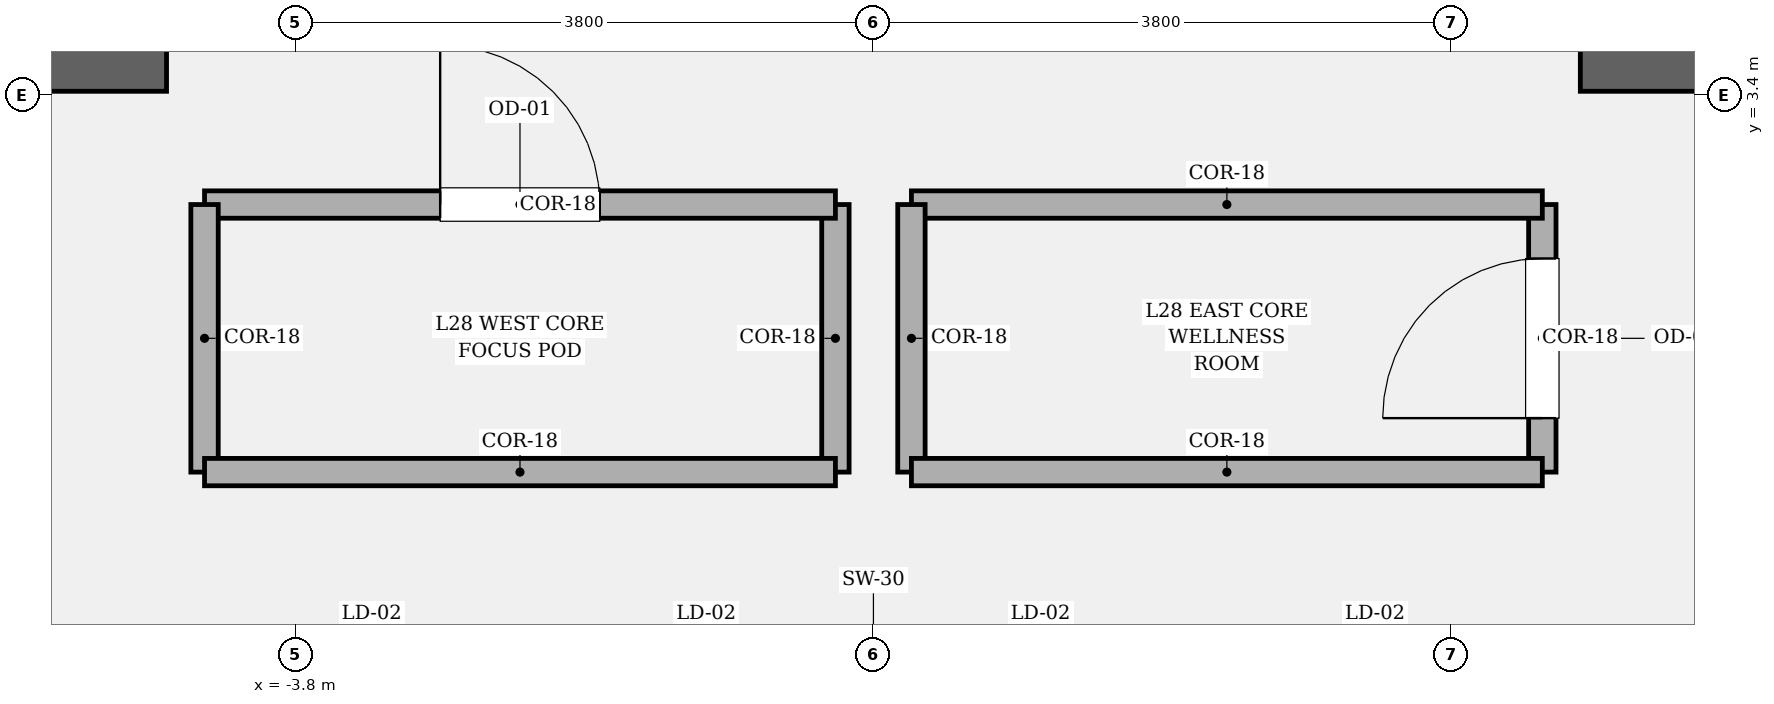
"""IFC4 building model, lengths in metres.
Left out: names, types, materials, properties, quantities, classifications, styles, units other than length and angle.
Written with IfcOpenShell. Run it as: python <this file> out.ifc"""

import sys

from ifc_helpers import new_model, si_unit, direction, frame, frame_2d, origin, place, context, subcontext, project, spatial, rectangle, extrude, element, fill, save


model = new_model("IFC4")
c1 = context("Model", 3, precision=1e-05, world=origin(), true_north=direction((0.0, 1.0)))
c2 = subcontext(c1, "Body", "Model", "MODEL_VIEW")
j1 = project(units=[si_unit("LENGTHUNIT", "METRE"), si_unit("PLANEANGLEUNIT", "RADIAN")], contexts=[c1])
p1 = place(None, origin())
s1 = spatial("IfcSite", under=j1, at=p1, CompositionType="ELEMENT")
p2 = place(p1, origin())
s2 = spatial("IfcBuilding", under=s1, at=p2, CompositionType="ELEMENT")
p3 = place(p2, frame((0.0, 0.0, 121.35)))
s3 = spatial("IfcBuildingStorey", under=s2, at=p3, CompositionType="ELEMENT", Elevation=121.35)
for number, where, z_axis, x_axis in (
    (1, (-9.825, 3.6, 0.0), (0.0, 0.0, 1.0), (1.0, 0.0, 0.0)),
    (2, (4.65, 3.6, 0.0), (0.0, 0.0, 1.0), (1.0, 0.0, 0.0)),
):
    element("IfcWall", number, at=place(p3, frame(where, z_axis=z_axis, x_axis=x_axis)), inside=s3, PredefinedType="SOLIDWALL", context=c2, shape_type="SweptSolid", body=[
        extrude(rectangle(XDim=5.175, YDim=0.35, at=frame_2d((2.587, 0.0))), origin(), (0.0, 0.0, 1.0), 4.05),
    ])
p4 = place(p3, frame((-0.25, 0.92, 0.0), z_axis=(0.0, 0.0, 1.0), x_axis=(0.0, 1.0, 0.0)))
e3 = element("IfcWall", 3, at=p4, inside=s3, PredefinedType="PARTITIONING", context=c2, shape_type="SweptSolid", body=[
    extrude(rectangle(XDim=1.76, YDim=0.18, at=frame_2d((0.88, 0.0))), origin(), (0.0, 0.0, 1.0), 3.73),
])
p5 = place(p3, frame((-0.25, 2.68, 0.0), z_axis=(0.0, 0.0, 1.0), x_axis=(-1.0, 0.0, 0.0)))
e4 = element("IfcWall", 4, at=p5, inside=s3, PredefinedType="PARTITIONING", context=c2, shape_type="SweptSolid", body=[
    extrude(rectangle(XDim=4.15, YDim=0.18, at=frame_2d((2.075, 0.0))), origin(), (0.0, 0.0, 1.0), 3.73),
])
p6 = place(p5, frame((1.55, 0.0, 0.0)))
e5 = element("IfcOpeningElement", 5, at=p6, cuts=e4, PredefinedType="OPENING", context=c2, shape_type="SweptSolid", body=[
    extrude(rectangle(XDim=1.05, YDim=2.2, at=frame_2d((0.525, 1.1))), frame((0.0, 0.1, 0.0), z_axis=(0.0, -1.0, 0.0), x_axis=(1.0, 0.0, 0.0)), (0.0, 0.0, 1.0), 0.2),
])
p7 = place(p3, frame((-4.4, 2.68, 0.0), z_axis=(0.0, 0.0, 1.0), x_axis=(0.0, -1.0, 0.0)))
e6 = element("IfcWall", 6, at=p7, inside=s3, PredefinedType="PARTITIONING", context=c2, shape_type="SweptSolid", body=[
    extrude(rectangle(XDim=1.76, YDim=0.18, at=frame_2d((0.88, 0.0))), origin(), (0.0, 0.0, 1.0), 3.73),
])
p8 = place(p3, frame((-4.4, 0.92, 0.0), z_axis=(0.0, 0.0, 1.0), x_axis=(1.0, 0.0, 0.0)))
e7 = element("IfcWall", 7, at=p8, inside=s3, PredefinedType="PARTITIONING", context=c2, shape_type="SweptSolid", body=[
    extrude(rectangle(XDim=4.15, YDim=0.18, at=frame_2d((2.075, 0.0))), origin(), (0.0, 0.0, 1.0), 3.73),
])
p9 = place(p3, frame((4.4, 0.92, 0.0), z_axis=(0.0, 0.0, 1.0), x_axis=(0.0, 1.0, 0.0)))
e8 = element("IfcWall", 8, at=p9, inside=s3, PredefinedType="PARTITIONING", context=c2, shape_type="SweptSolid", body=[
    extrude(rectangle(XDim=1.76, YDim=0.18, at=frame_2d((0.88, 0.0))), origin(), (0.0, 0.0, 1.0), 3.73),
])
p10 = place(p9, frame((0.355, 0.0, 0.0)))
e9 = element("IfcOpeningElement", 9, at=p10, cuts=e8, PredefinedType="OPENING", context=c2, shape_type="SweptSolid", body=[
    extrude(rectangle(XDim=1.05, YDim=2.2, at=frame_2d((0.525, 1.1))), frame((0.0, 0.1, 0.0), z_axis=(0.0, -1.0, 0.0), x_axis=(1.0, 0.0, 0.0)), (0.0, 0.0, 1.0), 0.2),
])
p11 = place(p3, frame((4.4, 2.68, 0.0), z_axis=(0.0, 0.0, 1.0), x_axis=(-1.0, 0.0, 0.0)))
e10 = element("IfcWall", 10, at=p11, inside=s3, PredefinedType="PARTITIONING", context=c2, shape_type="SweptSolid", body=[
    extrude(rectangle(XDim=4.15, YDim=0.18, at=frame_2d((2.075, 0.0))), origin(), (0.0, 0.0, 1.0), 3.73),
])
p12 = place(p3, frame((0.25, 2.68, 0.0), z_axis=(0.0, 0.0, 1.0), x_axis=(0.0, -1.0, 0.0)))
e11 = element("IfcWall", 11, at=p12, inside=s3, PredefinedType="PARTITIONING", context=c2, shape_type="SweptSolid", body=[
    extrude(rectangle(XDim=1.76, YDim=0.18, at=frame_2d((0.88, 0.0))), origin(), (0.0, 0.0, 1.0), 3.73),
])
p13 = place(p3, frame((0.25, 0.92, 0.0), z_axis=(0.0, 0.0, 1.0), x_axis=(1.0, 0.0, 0.0)))
e12 = element("IfcWall", 12, at=p13, inside=s3, PredefinedType="PARTITIONING", context=c2, shape_type="SweptSolid", body=[
    extrude(rectangle(XDim=4.15, YDim=0.18, at=frame_2d((2.075, 0.0))), origin(), (0.0, 0.0, 1.0), 3.73),
])
p14 = place(p6, origin())
e13 = element("IfcDoor", 13, at=p14, inside=s3, OperationType="SINGLE_SWING_RIGHT", PredefinedType="DOOR", context=c2, shape_type="SweptSolid", body=[
    extrude(rectangle(XDim=1.05, YDim=2.2, at=frame_2d((0.525, 1.1))), frame((0.0, 0.025, 0.0), z_axis=(0.0, -1.0, 0.0), x_axis=(1.0, 0.0, 0.0)), (0.0, 0.0, 1.0), 0.05),
])
fill(e5, e13)
p15 = place(p10, origin())
e14 = element("IfcDoor", 14, at=p15, inside=s3, OperationType="SINGLE_SWING_LEFT", PredefinedType="DOOR", context=c2, shape_type="SweptSolid", body=[
    extrude(rectangle(XDim=1.05, YDim=2.2, at=frame_2d((0.525, 1.1))), frame((0.0, 0.025, 0.0), z_axis=(0.0, -1.0, 0.0), x_axis=(1.0, 0.0, 0.0)), (0.0, 0.0, 1.0), 0.05),
])
fill(e9, e14)
save(model, sys.argv[1])
